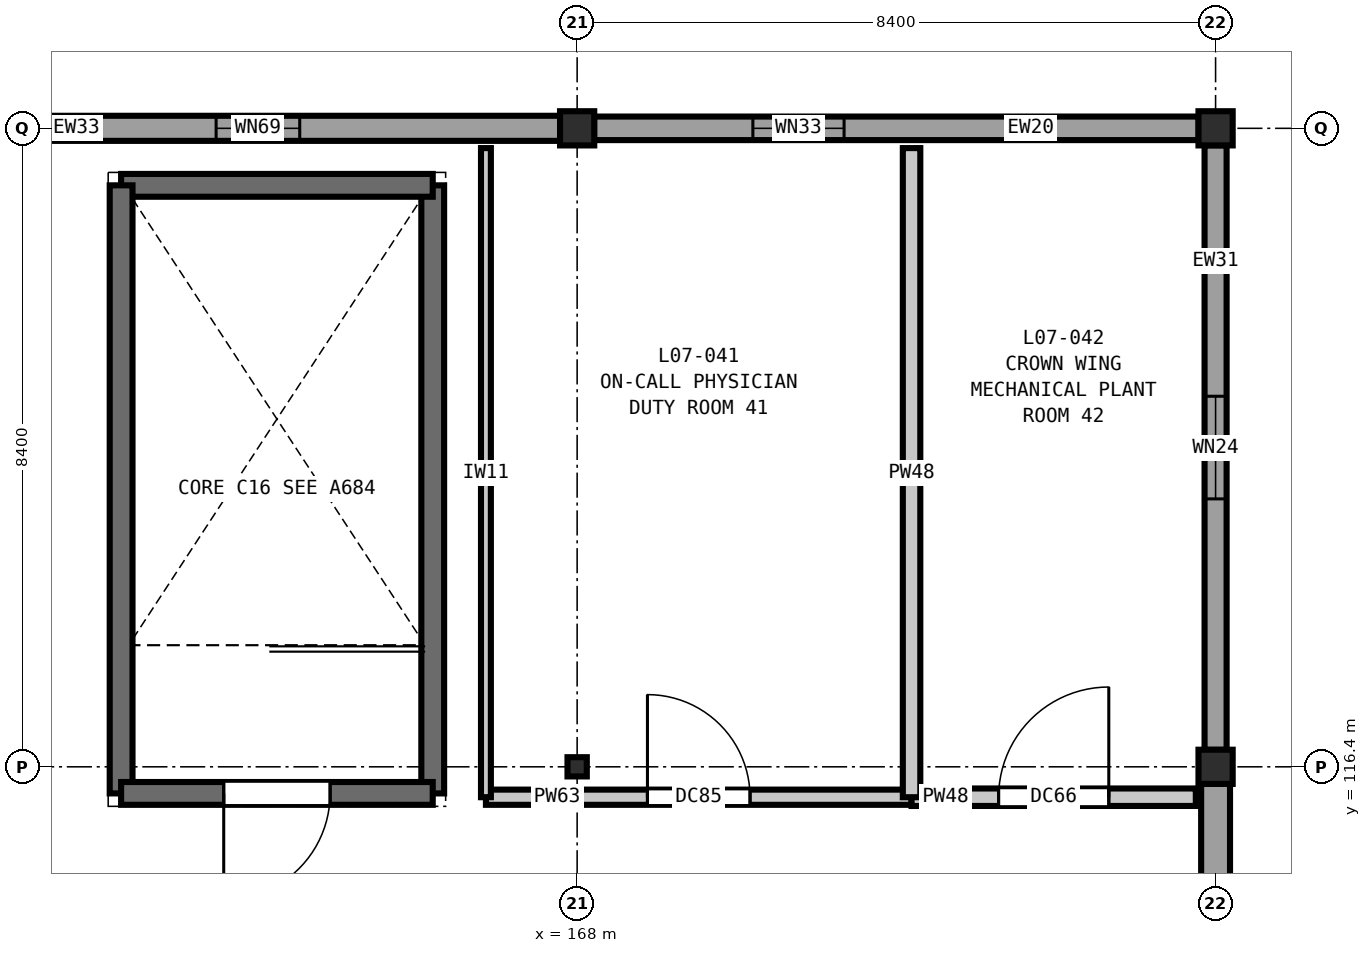
"""IFC4 building model, lengths in metres.
Left out: names, types, materials, properties, quantities, classifications, styles, units other than length and angle.
Written with IfcOpenShell. Run it as: python <this file> out.ifc"""

import sys

from ifc_helpers import new_model, si_unit, direction, frame, frame_2d, origin, origin_2d, place, context, subcontext, project, spatial, rectangle, i_section, extrude, element, fill, save


model = new_model("IFC4")
c1 = context("Model", 3, precision=1e-05, world=origin(), true_north=direction((0.0, 1.0)))
c2 = subcontext(c1, "Body", "Model", "MODEL_VIEW")
j1 = project(units=[si_unit("LENGTHUNIT", "METRE"), si_unit("PLANEANGLEUNIT", "RADIAN")], contexts=[c1])
p1 = place(None, origin())
s1 = spatial("IfcSite", under=j1, at=p1, CompositionType="ELEMENT")
p2 = place(p1, origin())
s2 = spatial("IfcBuilding", under=s1, at=p2, CompositionType="ELEMENT")
p3 = place(p2, frame((0.0, 0.0, 33.0)))
s3 = spatial("IfcBuildingStorey", under=s2, at=p3, CompositionType="ELEMENT", Elevation=33.0)
p4 = place(p3, frame((168.0, 116.4, 0.0), z_axis=(0.0, 0.0, 1.0), x_axis=(1.0, 0.0, 0.0)))
e1 = element("IfcColumn", 1, at=p4, inside=s3, PredefinedType="COLUMN", context=c2, shape_type="SweptSolid", body=[
    extrude(i_section(OverallWidth=0.254, OverallDepth=0.253, WebThickness=0.009, FlangeThickness=0.014, FilletRadius=0.013, at=origin_2d()), origin(), (0.0, 0.0, 1.0), 4.2),
])
for number, where, z_axis, x_axis in (
    (2, (168.0, 124.8, 0.0), (0.0, 0.0, 1.0), (1.0, 0.0, 0.0)),
    (3, (176.4, 116.4, 0.0), (0.0, 0.0, 1.0), (1.0, 0.0, 0.0)),
    (4, (176.4, 124.8, 0.0), (0.0, 0.0, 1.0), (1.0, 0.0, 0.0)),
):
    element("IfcColumn", number, at=place(p3, frame(where, z_axis=z_axis, x_axis=x_axis)), inside=s3, PredefinedType="COLUMN", context=c2, shape_type="SweptSolid", body=[
        extrude(rectangle(XDim=0.45, YDim=0.45, at=origin_2d()), origin(), (0.0, 0.0, 1.0), 4.2),
    ])
p5 = place(p3, frame((159.823, 124.8, 0.0), z_axis=(0.0, 0.0, 1.0), x_axis=(1.0, 0.0, 0.0)))
e5 = element("IfcWall", 5, at=p5, inside=s3, PredefinedType="SOLIDWALL", context=c2, shape_type="SweptSolid", body=[
    extrude(rectangle(XDim=7.954, YDim=0.33, at=frame_2d((3.977, 0.0))), origin(), (0.0, 0.0, 1.0), 3.48),
])
p6 = place(p5, frame((3.427, 0.0, 0.9)))
e6 = element("IfcOpeningElement", 6, at=p6, cuts=e5, PredefinedType="OPENING", context=c2, shape_type="SweptSolid", body=[
    extrude(rectangle(XDim=1.1, YDim=1.55, at=frame_2d((0.55, 0.775))), frame((0.0, 0.175, 0.0), z_axis=(0.0, -1.0, 0.0), x_axis=(1.0, 0.0, 0.0)), (0.0, 0.0, 1.0), 0.35),
])
p7 = place(p3, frame((168.223, 124.8, 0.0), z_axis=(0.0, 0.0, 1.0), x_axis=(1.0, 0.0, 0.0)))
e7 = element("IfcWall", 7, at=p7, inside=s3, PredefinedType="SOLIDWALL", context=c2, shape_type="SweptSolid", body=[
    extrude(rectangle(XDim=7.954, YDim=0.31, at=frame_2d((3.977, 0.0))), origin(), (0.0, 0.0, 1.0), 3.48),
])
p8 = place(p7, frame((2.089, 0.0, 0.9)))
e8 = element("IfcOpeningElement", 8, at=p8, cuts=e7, PredefinedType="OPENING", context=c2, shape_type="SweptSolid", body=[
    extrude(rectangle(XDim=1.2, YDim=1.55, at=frame_2d((0.6, 0.775))), frame((0.0, 0.165, 0.0), z_axis=(0.0, -1.0, 0.0), x_axis=(1.0, 0.0, 0.0)), (0.0, 0.0, 1.0), 0.33),
])
p9 = place(p3, frame((176.4, 124.577, 0.0), z_axis=(0.0, 0.0, 1.0), x_axis=(0.0, -1.0, 0.0)))
e9 = element("IfcWall", 9, at=p9, inside=s3, PredefinedType="SOLIDWALL", context=c2, shape_type="SweptSolid", body=[
    extrude(rectangle(XDim=7.954, YDim=0.29, at=frame_2d((3.977, 0.0))), origin(), (0.0, 0.0, 1.0), 3.48),
])
p10 = place(p9, frame((3.302, 0.0, 0.9)))
e10 = element("IfcOpeningElement", 10, at=p10, cuts=e9, PredefinedType="OPENING", context=c2, shape_type="SweptSolid", body=[
    extrude(rectangle(XDim=1.35, YDim=1.55, at=frame_2d((0.675, 0.775))), frame((0.0, 0.155, 0.0), z_axis=(0.0, -1.0, 0.0), x_axis=(1.0, 0.0, 0.0)), (0.0, 0.0, 1.0), 0.31),
])
p11 = place(p3, frame((176.4, 116.177, 0.0), z_axis=(0.0, 0.0, 1.0), x_axis=(0.0, -1.0, 0.0)))
e11 = element("IfcWall", 11, at=p11, inside=s3, PredefinedType="SOLIDWALL", context=c2, shape_type="SweptSolid", body=[
    extrude(rectangle(XDim=6.754, YDim=0.38, at=frame_2d((3.377, 0.0))), origin(), (0.0, 0.0, 1.0), 3.48),
])
p12 = place(p3, frame((166.1, 116.05, 0.0), z_axis=(0.0, 0.0, 1.0), x_axis=(0.0, 1.0, 0.0)))
e12 = element("IfcWall", 12, at=p12, inside=s3, PredefinedType="SHEAR", context=c2, shape_type="SweptSolid", body=[
    extrude(rectangle(XDim=8.0, YDim=0.3, at=frame_2d((4.0, 0.0))), origin(), (0.0, 0.0, 1.0), 4.2),
])
p13 = place(p3, frame((166.1, 124.05, 0.0), z_axis=(0.0, 0.0, 1.0), x_axis=(-1.0, 0.0, 0.0)))
e13 = element("IfcWall", 13, at=p13, inside=s3, PredefinedType="SHEAR", context=c2, shape_type="SweptSolid", body=[
    extrude(rectangle(XDim=4.1, YDim=0.3, at=frame_2d((2.05, 0.0))), origin(), (0.0, 0.0, 1.0), 4.2),
])
p14 = place(p3, frame((162.0, 124.05, 0.0), z_axis=(0.0, 0.0, 1.0), x_axis=(0.0, -1.0, 0.0)))
e14 = element("IfcWall", 14, at=p14, inside=s3, PredefinedType="SHEAR", context=c2, shape_type="SweptSolid", body=[
    extrude(rectangle(XDim=8.0, YDim=0.3, at=frame_2d((4.0, 0.0))), origin(), (0.0, 0.0, 1.0), 4.2),
])
p15 = place(p3, frame((162.0, 116.05, 0.0), z_axis=(0.0, 0.0, 1.0), x_axis=(1.0, 0.0, 0.0)))
e15 = element("IfcWall", 15, at=p15, inside=s3, PredefinedType="SHEAR", context=c2, shape_type="SweptSolid", body=[
    extrude(rectangle(XDim=4.1, YDim=0.3, at=frame_2d((2.05, 0.0))), origin(), (0.0, 0.0, 1.0), 4.2),
])
p16 = place(p15, frame((1.35, 0.0, 0.0)))
e16 = element("IfcOpeningElement", 16, at=p16, cuts=e15, PredefinedType="OPENING", context=c2, shape_type="SweptSolid", body=[
    extrude(rectangle(XDim=1.4, YDim=2.2, at=frame_2d((0.7, 1.1))), frame((0.0, 0.16, 0.0), z_axis=(0.0, -1.0, 0.0), x_axis=(1.0, 0.0, 0.0)), (0.0, 0.0, 1.0), 0.32),
])
p17 = place(p3, frame((166.8, 116.0, 0.0), z_axis=(0.0, 0.0, 1.0), x_axis=(1.0, 0.0, 0.0)))
e17 = element("IfcWall", 17, at=p17, inside=s3, PredefinedType="PARTITIONING", context=c2, shape_type="SweptSolid", body=[
    extrude(rectangle(XDim=5.6, YDim=0.2, at=frame_2d((2.8, 0.0))), origin(), (0.0, 0.0, 1.0), 3.92),
])
p18 = place(p17, frame((2.125, 0.0, 0.0)))
e18 = element("IfcOpeningElement", 18, at=p18, cuts=e17, PredefinedType="OPENING", context=c2, shape_type="SweptSolid", body=[
    extrude(rectangle(XDim=1.35, YDim=2.2, at=frame_2d((0.675, 1.1))), frame((0.0, 0.11, 0.0), z_axis=(0.0, -1.0, 0.0), x_axis=(1.0, 0.0, 0.0)), (0.0, 0.0, 1.0), 0.22),
])
p19 = place(p3, frame((172.4, 116.0, 0.0), z_axis=(0.0, 0.0, 1.0), x_axis=(1.0, 0.0, 0.0)))
e19 = element("IfcWall", 19, at=p19, inside=s3, PredefinedType="PARTITIONING", context=c2, shape_type="SweptSolid", body=[
    extrude(rectangle(XDim=3.74, YDim=0.23, at=frame_2d((1.87, 0.0))), origin(), (0.0, 0.0, 1.0), 3.92),
])
p20 = place(p19, frame((1.145, 0.0, 0.0)))
e20 = element("IfcOpeningElement", 20, at=p20, cuts=e19, PredefinedType="OPENING", context=c2, shape_type="SweptSolid", body=[
    extrude(rectangle(XDim=1.45, YDim=2.25, at=frame_2d((0.725, 1.125))), frame((0.0, 0.125, 0.0), z_axis=(0.0, -1.0, 0.0), x_axis=(1.0, 0.0, 0.0)), (0.0, 0.0, 1.0), 0.25),
])
p21 = place(p3, frame((166.8, 116.0, 0.0), z_axis=(0.0, 0.0, 1.0), x_axis=(0.0, 1.0, 0.0)))
e21 = element("IfcWall", 21, at=p21, inside=s3, PredefinedType="PARTITIONING", context=c2, shape_type="SweptSolid", body=[
    extrude(rectangle(XDim=8.54, YDim=0.13, at=frame_2d((4.27, 0.0))), origin(), (0.0, 0.0, 1.0), 3.92),
])
p22 = place(p3, frame((172.4, 116.0, 0.0), z_axis=(0.0, 0.0, 1.0), x_axis=(0.0, 1.0, 0.0)))
e22 = element("IfcWall", 22, at=p22, inside=s3, PredefinedType="PARTITIONING", context=c2, shape_type="SweptSolid", body=[
    extrude(rectangle(XDim=8.54, YDim=0.23, at=frame_2d((4.27, 0.0))), origin(), (0.0, 0.0, 1.0), 3.92),
])
p23 = place(p6, origin())
e23 = element("IfcWindow", 23, at=p23, inside=s3, PartitioningType="SINGLE_PANEL", PredefinedType="WINDOW", context=c2, shape_type="SweptSolid", body=[
    extrude(rectangle(XDim=1.1, YDim=1.55, at=frame_2d((0.55, 0.775))), frame((0.0, 0.03, 0.0), z_axis=(0.0, -1.0, 0.0), x_axis=(1.0, 0.0, 0.0)), (0.0, 0.0, 1.0), 0.06),
])
fill(e6, e23)
p24 = place(p8, origin())
e24 = element("IfcWindow", 24, at=p24, inside=s3, PartitioningType="SINGLE_PANEL", PredefinedType="WINDOW", context=c2, shape_type="SweptSolid", body=[
    extrude(rectangle(XDim=1.2, YDim=1.55, at=frame_2d((0.6, 0.775))), frame((0.0, 0.03, 0.0), z_axis=(0.0, -1.0, 0.0), x_axis=(1.0, 0.0, 0.0)), (0.0, 0.0, 1.0), 0.06),
])
fill(e8, e24)
p25 = place(p10, origin())
e25 = element("IfcWindow", 25, at=p25, inside=s3, PartitioningType="SINGLE_PANEL", PredefinedType="WINDOW", context=c2, shape_type="SweptSolid", body=[
    extrude(rectangle(XDim=1.35, YDim=1.55, at=frame_2d((0.675, 0.775))), frame((0.0, 0.03, 0.0), z_axis=(0.0, -1.0, 0.0), x_axis=(1.0, 0.0, 0.0)), (0.0, 0.0, 1.0), 0.06),
])
fill(e10, e25)
p26 = place(p16, frame((1.4, 0.0, 0.0), z_axis=(0.0, 0.0, 1.0), x_axis=(-1.0, 0.0, 0.0)))
e26 = element("IfcDoor", 26, at=p26, inside=s3, OperationType="SINGLE_SWING_RIGHT", PredefinedType="DOOR", context=c2, shape_type="SweptSolid", body=[
    extrude(rectangle(XDim=1.4, YDim=2.2, at=frame_2d((0.7, 1.1))), frame((0.0, 0.025, 0.0), z_axis=(0.0, -1.0, 0.0), x_axis=(1.0, 0.0, 0.0)), (0.0, 0.0, 1.0), 0.05),
])
fill(e16, e26)
p27 = place(p18, origin())
e27 = element("IfcDoor", 27, at=p27, inside=s3, OperationType="SINGLE_SWING_LEFT", PredefinedType="DOOR", context=c2, shape_type="SweptSolid", body=[
    extrude(rectangle(XDim=1.35, YDim=2.2, at=frame_2d((0.675, 1.1))), frame((0.0, 0.025, 0.0), z_axis=(0.0, -1.0, 0.0), x_axis=(1.0, 0.0, 0.0)), (0.0, 0.0, 1.0), 0.05),
])
fill(e18, e27)
p28 = place(p20, origin())
e28 = element("IfcDoor", 28, at=p28, inside=s3, OperationType="SINGLE_SWING_RIGHT", PredefinedType="DOOR", context=c2, shape_type="SweptSolid", body=[
    extrude(rectangle(XDim=1.45, YDim=2.25, at=frame_2d((0.725, 1.125))), frame((0.0, 0.025, 0.0), z_axis=(0.0, -1.0, 0.0), x_axis=(1.0, 0.0, 0.0)), (0.0, 0.0, 1.0), 0.05),
])
fill(e20, e28)
save(model, sys.argv[1])
